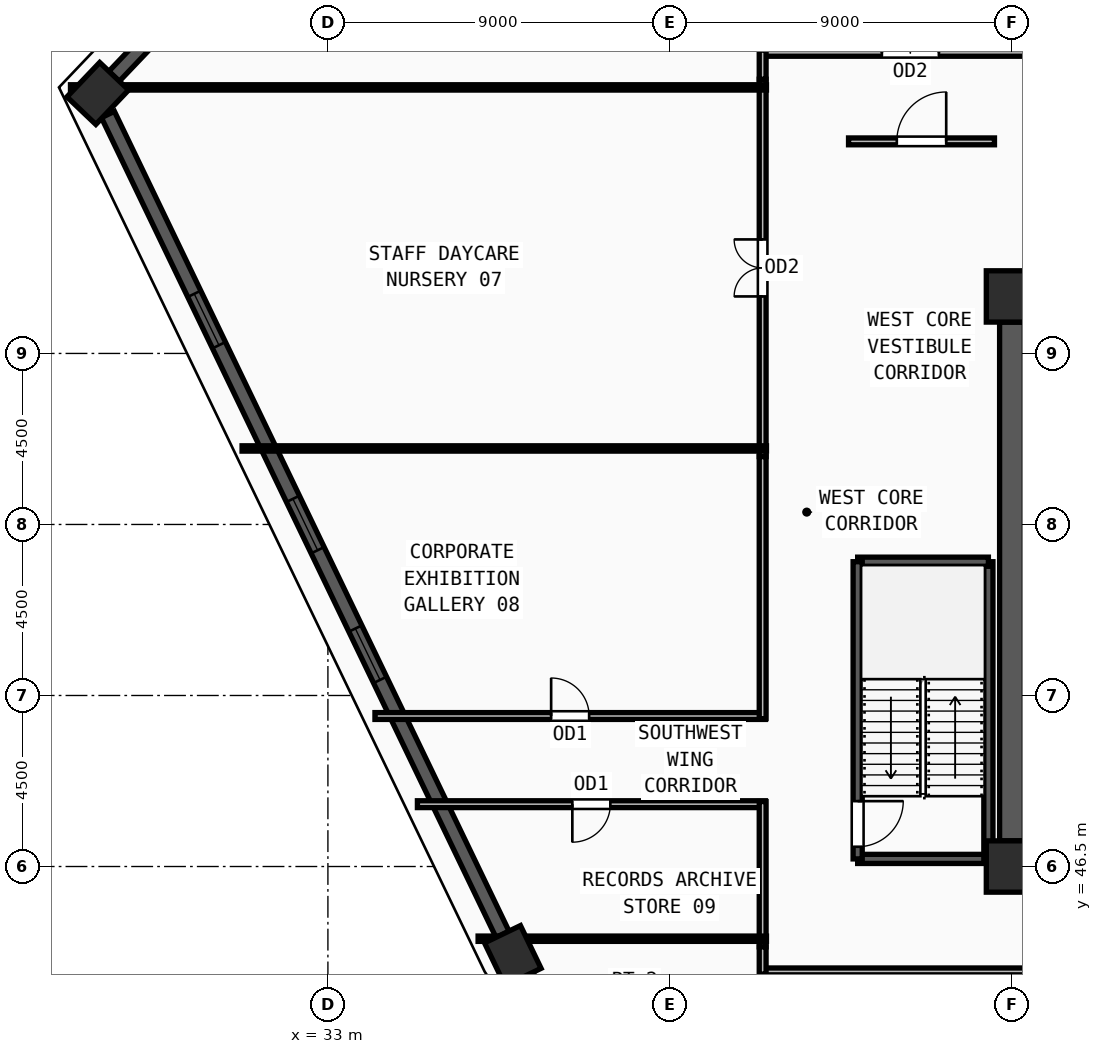
"""IFC4 building model, lengths in metres.
Left out: names, types, materials, properties, quantities, classifications, styles, units other than length and angle.
Written with IfcOpenShell. Run it as: python <this file> out.ifc"""

import sys

from ifc_helpers import new_model, si_unit, direction, frame, frame_2d, origin, origin_2d, place, context, subcontext, project, spatial, rectangle, extrude, source, transform, mapped, element, fill, save


model = new_model("IFC4")
c1 = context("Model", 3, precision=1e-05, world=origin(), true_north=direction((0.0, 1.0)))
c2 = subcontext(c1, "Body", "Model", "MODEL_VIEW")
j1 = project(units=[si_unit("LENGTHUNIT", "METRE"), si_unit("PLANEANGLEUNIT", "RADIAN")], contexts=[c1])
p1 = place(None, origin())
s1 = spatial("IfcSite", under=j1, at=p1, CompositionType="ELEMENT")
p2 = place(p1, origin())
s2 = spatial("IfcBuilding", under=s1, at=p2, CompositionType="ELEMENT")
p3 = place(p2, frame((0.0, 0.0, 224.25)))
s3 = spatial("IfcBuildingStorey", under=s2, at=p3, CompositionType="ELEMENT", Elevation=224.25)
m1 = source(origin(), c2, "Body", "SweptSolid", [
    extrude(rectangle(XDim=1.35, YDim=1.35, at=origin_2d()), origin(), (0.0, 0.0, 1.0), 3.75),
])
for number, where, z_axis, x_axis in (
    (1, (51.0, 46.5, 0.0), (0.0, 0.0, 1.0), (1.0, 0.0, 0.0)),
    (2, (51.0, 61.5, 0.0), (0.0, 0.0, 1.0), (1.0, 0.0, 0.0)),
):
    element("IfcColumn", number, at=place(p3, frame(where, z_axis=z_axis, x_axis=x_axis)), inside=s3, PredefinedType="COLUMN", context=c2, shape_type="MappedRepresentation", body=[
        mapped(m1, transform((0.0, 0.0, 0.0), x_axis=(1.0, 0.0, 0.0), y_axis=(0.0, 1.0, 0.0), z_axis=(0.0, 0.0, 1.0), scale=1.0)),
    ])
m2 = source(origin(), c2, "Body", "SweptSolid", [
    extrude(rectangle(XDim=1.25, YDim=1.05, at=origin_2d()), origin(), (0.0, 0.0, 1.0), 3.75),
])
for number, where, z_axis, x_axis in (
    (3, (37.865, 44.155, 0.0), (0.0, 0.0, 1.0), (-0.434, 0.901, 0.0)),
    (4, (26.944, 66.841, 0.0), (0.0, 0.0, 1.0), (0.689, 0.724, 0.0)),
):
    element("IfcColumn", number, at=place(p3, frame(where, z_axis=z_axis, x_axis=x_axis)), inside=s3, PredefinedType="COLUMN", context=c2, shape_type="MappedRepresentation", body=[
        mapped(m2, transform((0.0, 0.0, 0.0), x_axis=(1.0, 0.0, 0.0), y_axis=(0.0, 1.0, 0.0), z_axis=(0.0, 0.0, 1.0), scale=1.0)),
    ])
p4 = place(p3, frame((30.354, 70.425, 0.0), z_axis=(0.0, 0.0, 1.0), x_axis=(-0.689360975367, -0.724418004774, 0.0)))
e5 = element("IfcWall", 5, at=p4, inside=s3, PredefinedType="SOLIDWALL", context=c2, shape_type="SweptSolid", body=[
    extrude(rectangle(XDim=4.332, YDim=0.38, at=frame_2d((2.166, 0.0))), origin(), (0.0, 0.0, 1.0), 3.57),
])
m3 = source(origin(), c2, "Body", "SweptSolid", [
    extrude(rectangle(XDim=1.2, YDim=1.9, at=frame_2d((0.6, 0.95))), frame((0.0, 0.2, 0.0), z_axis=(0.0, -1.0, 0.0), x_axis=(1.0, 0.0, 0.0)), (0.0, 0.0, 1.0), 0.4),
])
p5 = place(p4, frame((1.566, 0.0, 0.55)))
e6 = element("IfcOpeningElement", 6, at=p5, cuts=e5, PredefinedType="OPENING", context=c2, shape_type="MappedRepresentation", body=[
    mapped(m3, transform((0.0, 0.0, 0.0), x_axis=(1.0, 0.0, 0.0), y_axis=(0.0, 1.0, 0.0), z_axis=(0.0, 0.0, 1.0), scale=1.0)),
])
p6 = place(p3, frame((27.211, 66.287, 0.0), z_axis=(0.0, 0.0, 1.0), x_axis=(0.433730710757, -0.901042546469, 0.0)))
e7 = element("IfcWall", 7, at=p6, inside=s3, PredefinedType="SOLIDWALL", context=c2, shape_type="SweptSolid", body=[
    extrude(rectangle(XDim=23.948, YDim=0.38, at=frame_2d((11.974, 0.0))), origin(), (0.0, 0.0, 1.0), 3.57),
])
m4 = source(origin(), c2, "Body", "SweptSolid", [
    extrude(rectangle(XDim=1.5, YDim=1.9, at=frame_2d((0.75, 0.95))), frame((0.0, 0.2, 0.0), z_axis=(0.0, -1.0, 0.0), x_axis=(1.0, 0.0, 0.0)), (0.0, 0.0, 1.0), 0.4),
])
p7 = place(p6, frame((5.237, 0.0, 0.55)))
e8 = element("IfcOpeningElement", 8, at=p7, cuts=e7, PredefinedType="OPENING", context=c2, shape_type="MappedRepresentation", body=[
    mapped(m4, transform((0.0, 0.0, 0.0), x_axis=(1.0, 0.0, 0.0), y_axis=(0.0, 1.0, 0.0), z_axis=(0.0, 0.0, 1.0), scale=1.0)),
])
p8 = place(p6, frame((11.224, 0.0, 0.55)))
e9 = element("IfcOpeningElement", 9, at=p8, cuts=e7, PredefinedType="OPENING", context=c2, shape_type="MappedRepresentation", body=[
    mapped(m4, transform((0.0, 0.0, 0.0), x_axis=(1.0, 0.0, 0.0), y_axis=(0.0, 1.0, 0.0), z_axis=(0.0, 0.0, 1.0), scale=1.0)),
])
p9 = place(p6, frame((15.011, 0.0, 0.55)))
e10 = element("IfcOpeningElement", 10, at=p9, cuts=e7, PredefinedType="OPENING", context=c2, shape_type="MappedRepresentation", body=[
    mapped(m4, transform((0.0, 0.0, 0.0), x_axis=(1.0, 0.0, 0.0), y_axis=(0.0, 1.0, 0.0), z_axis=(0.0, 0.0, 1.0), scale=1.0)),
])
p10 = place(p3, frame((38.205, 43.643, 0.0), z_axis=(0.0, 0.0, 1.0), x_axis=(0.553179293126, -0.83306222436, 0.0)))
e11 = element("IfcWall", 11, at=p10, inside=s3, PredefinedType="SOLIDWALL", context=c2, shape_type="SweptSolid", body=[
    extrude(rectangle(XDim=29.023, YDim=0.38, at=frame_2d((14.511, 0.0))), origin(), (0.0, 0.0, 1.0), 3.57),
])
p11 = place(p10, frame((6.506, 0.0, 0.55)))
e12 = element("IfcOpeningElement", 12, at=p11, cuts=e11, PredefinedType="OPENING", context=c2, shape_type="MappedRepresentation", body=[
    mapped(m4, transform((0.0, 0.0, 0.0), x_axis=(1.0, 0.0, 0.0), y_axis=(0.0, 1.0, 0.0), z_axis=(0.0, 0.0, 1.0), scale=1.0)),
])
p12 = place(p10, frame((13.762, 0.0, 0.55)))
e13 = element("IfcOpeningElement", 13, at=p12, cuts=e11, PredefinedType="OPENING", context=c2, shape_type="MappedRepresentation", body=[
    mapped(m4, transform((0.0, 0.0, 0.0), x_axis=(1.0, 0.0, 0.0), y_axis=(0.0, 1.0, 0.0), z_axis=(0.0, 0.0, 1.0), scale=1.0)),
])
p13 = place(p10, frame((21.017, 0.0, 0.55)))
e14 = element("IfcOpeningElement", 14, at=p13, cuts=e11, PredefinedType="OPENING", context=c2, shape_type="MappedRepresentation", body=[
    mapped(m4, transform((0.0, 0.0, 0.0), x_axis=(1.0, 0.0, 0.0), y_axis=(0.0, 1.0, 0.0), z_axis=(0.0, 0.0, 1.0), scale=1.0)),
])
p14 = place(p3, frame((51.0, 47.175, 0.0), z_axis=(0.0, 0.0, 1.0), x_axis=(0.0, 1.0, 0.0)))
e15 = element("IfcWall", 15, at=p14, inside=s3, PredefinedType="SHEAR", context=c2, shape_type="SweptSolid", body=[
    extrude(rectangle(XDim=13.65, YDim=0.65, at=frame_2d((6.825, 0.0))), origin(), (0.0, 0.0, 1.0), 3.57),
])
p15 = place(p3, frame((46.94, 46.7, 0.0), z_axis=(0.0, 0.0, 1.0), x_axis=(1.0, 0.0, 0.0)))
e16 = element("IfcWall", 16, at=p15, inside=s3, PredefinedType="SOLIDWALL", context=c2, shape_type="SweptSolid", body=[
    extrude(rectangle(XDim=3.44, YDim=0.24, at=frame_2d((1.72, 0.0))), origin(), (0.0, 0.0, 1.0), 3.57),
])
p16 = place(p3, frame((50.38, 46.7, 0.0), z_axis=(0.0, 0.0, 1.0), x_axis=(0.0, 1.0, 0.0)))
e17 = element("IfcWall", 17, at=p16, inside=s3, PredefinedType="SOLIDWALL", context=c2, shape_type="SweptSolid", body=[
    extrude(rectangle(XDim=7.82, YDim=0.24, at=frame_2d((3.91, 0.0))), origin(), (0.0, 0.0, 1.0), 3.57),
])
p17 = place(p3, frame((50.38, 54.52, 0.0), z_axis=(0.0, 0.0, 1.0), x_axis=(-1.0, 0.0, 0.0)))
e18 = element("IfcWall", 18, at=p17, inside=s3, PredefinedType="SOLIDWALL", context=c2, shape_type="SweptSolid", body=[
    extrude(rectangle(XDim=3.44, YDim=0.24, at=frame_2d((1.72, 0.0))), origin(), (0.0, 0.0, 1.0), 3.57),
])
p18 = place(p3, frame((46.94, 54.52, 0.0), z_axis=(0.0, 0.0, 1.0), x_axis=(0.0, -1.0, 0.0)))
e19 = element("IfcWall", 19, at=p18, inside=s3, PredefinedType="SOLIDWALL", context=c2, shape_type="SweptSolid", body=[
    extrude(rectangle(XDim=7.82, YDim=0.24, at=frame_2d((3.91, 0.0))), origin(), (0.0, 0.0, 1.0), 3.57),
])
m5 = source(origin(), c2, "Body", "SweptSolid", [
    extrude(rectangle(XDim=1.2, YDim=2.2, at=frame_2d((0.6, 1.1))), frame((0.0, 0.13, 0.0), z_axis=(0.0, -1.0, 0.0), x_axis=(1.0, 0.0, 0.0)), (0.0, 0.0, 1.0), 0.26),
])
p19 = place(p18, frame((6.3, 0.0, 0.0)))
e20 = element("IfcOpeningElement", 20, at=p19, cuts=e19, PredefinedType="OPENING", context=c2, shape_type="MappedRepresentation", body=[
    mapped(m5, transform((0.0, 0.0, 0.0), x_axis=(1.0, 0.0, 0.0), y_axis=(0.0, 1.0, 0.0), z_axis=(0.0, 0.0, 1.0), scale=1.0)),
])
p20 = place(p3, frame((46.7, 65.58, 0.0), z_axis=(0.0, 0.0, 1.0), x_axis=(1.0, 0.0, 0.0)))
e21 = element("IfcWall", 21, at=p20, inside=s3, PredefinedType="PARTITIONING", context=c2, shape_type="SweptSolid", body=[
    extrude(rectangle(XDim=3.84, YDim=0.18, at=frame_2d((1.92, 0.0))), origin(), (0.0, 0.0, 1.0), 3.57),
])
m6 = source(origin(), c2, "Body", "SweptSolid", [
    extrude(rectangle(XDim=1.3, YDim=2.2, at=frame_2d((0.65, 1.1))), frame((0.0, 0.1, 0.0), z_axis=(0.0, -1.0, 0.0), x_axis=(1.0, 0.0, 0.0)), (0.0, 0.0, 1.0), 0.2),
])
p21 = place(p20, frame((1.27, 0.0, 0.0)))
e22 = element("IfcOpeningElement", 22, at=p21, cuts=e21, PredefinedType="OPENING", context=c2, shape_type="MappedRepresentation", body=[
    mapped(m6, transform((0.0, 0.0, 0.0), x_axis=(1.0, 0.0, 0.0), y_axis=(0.0, 1.0, 0.0), z_axis=(0.0, 0.0, 1.0), scale=1.0)),
])
p22 = place(p3, frame((44.37, 67.91, 0.0), z_axis=(0.0, 0.0, 1.0), x_axis=(1.0, 0.0, 0.0)))
e23 = element("IfcWall", 23, at=p22, inside=s3, PredefinedType="PARTITIONING", context=c2, shape_type="SweptSolid", body=[
    extrude(rectangle(XDim=7.915, YDim=0.18, at=frame_2d((3.958, 0.0))), origin(), (0.0, 0.0, 1.0), 3.205),
])
m7 = source(origin(), c2, "Body", "SweptSolid", [
    extrude(rectangle(XDim=1.5, YDim=2.2, at=frame_2d((0.75, 1.1))), frame((0.0, 0.1, 0.0), z_axis=(0.0, -1.0, 0.0), x_axis=(1.0, 0.0, 0.0)), (0.0, 0.0, 1.0), 0.2),
])
p23 = place(p22, frame((3.207, 0.0, 0.0)))
e24 = element("IfcOpeningElement", 24, at=p23, cuts=e23, PredefinedType="OPENING", context=c2, shape_type="MappedRepresentation", body=[
    mapped(m7, transform((0.0, 0.0, 0.0), x_axis=(1.0, 0.0, 0.0), y_axis=(0.0, 1.0, 0.0), z_axis=(0.0, 0.0, 1.0), scale=1.0)),
])
p24 = place(p3, frame((44.44, 57.285, 0.0), z_axis=(0.0, 0.0, 1.0), x_axis=(0.0, 1.0, 0.0)))
e25 = element("IfcWall", 25, at=p24, inside=s3, PredefinedType="PARTITIONING", context=c2, shape_type="SweptSolid", body=[
    extrude(rectangle(XDim=9.93, YDim=0.18, at=frame_2d((4.965, 0.0))), origin(), (0.0, 0.0, 1.0), 3.57),
])
p25 = place(p24, frame((4.215, 0.0, 0.0)))
e26 = element("IfcOpeningElement", 26, at=p25, cuts=e25, PredefinedType="OPENING", context=c2, shape_type="MappedRepresentation", body=[
    mapped(m7, transform((0.0, 0.0, 0.0), x_axis=(1.0, 0.0, 0.0), y_axis=(0.0, 1.0, 0.0), z_axis=(0.0, 0.0, 1.0), scale=1.0)),
])
p26 = place(p3, frame((34.238, 50.46, 0.0), z_axis=(0.0, 0.0, 1.0), x_axis=(1.0, 0.0, 0.0)))
e27 = element("IfcWall", 27, at=p26, inside=s3, PredefinedType="PARTITIONING", context=c2, shape_type="SweptSolid", body=[
    extrude(rectangle(XDim=10.272, YDim=0.18, at=frame_2d((5.136, 0.0))), origin(), (0.0, 0.0, 1.0), 3.57),
])
m8 = source(origin(), c2, "Body", "SweptSolid", [
    extrude(rectangle(XDim=1.0, YDim=2.2, at=frame_2d((0.5, 1.1))), frame((0.0, 0.1, 0.0), z_axis=(0.0, -1.0, 0.0), x_axis=(1.0, 0.0, 0.0)), (0.0, 0.0, 1.0), 0.2),
])
p27 = place(p26, frame((4.636, 0.0, 0.0)))
e28 = element("IfcOpeningElement", 28, at=p27, cuts=e27, PredefinedType="OPENING", context=c2, shape_type="MappedRepresentation", body=[
    mapped(m8, transform((0.0, 0.0, 0.0), x_axis=(1.0, 0.0, 0.0), y_axis=(0.0, 1.0, 0.0), z_axis=(0.0, 0.0, 1.0), scale=1.0)),
])
p28 = place(p3, frame((44.51, 48.14, 0.0), z_axis=(0.0, 0.0, 1.0), x_axis=(-1.0, 0.0, 0.0)))
e29 = element("IfcWall", 29, at=p28, inside=s3, PredefinedType="PARTITIONING", context=c2, shape_type="SweptSolid", body=[
    extrude(rectangle(XDim=9.155, YDim=0.18, at=frame_2d((4.578, 0.0))), origin(), (0.0, 0.0, 1.0), 3.57),
])
p29 = place(p28, frame((4.078, 0.0, 0.0)))
e30 = element("IfcOpeningElement", 30, at=p29, cuts=e29, PredefinedType="OPENING", context=c2, shape_type="MappedRepresentation", body=[
    mapped(m8, transform((0.0, 0.0, 0.0), x_axis=(1.0, 0.0, 0.0), y_axis=(0.0, 1.0, 0.0), z_axis=(0.0, 0.0, 1.0), scale=1.0)),
])
p30 = place(p3, frame((65.215, 43.74, 0.0), z_axis=(0.0, 0.0, 1.0), x_axis=(-1.0, 0.0, 0.0)))
e31 = element("IfcWall", 31, at=p30, inside=s3, PredefinedType="PARTITIONING", context=c2, shape_type="SweptSolid", body=[
    extrude(rectangle(XDim=20.845, YDim=0.18, at=frame_2d((10.422, 0.0))), origin(), (0.0, 0.0, 1.0), 3.57),
])
p31 = place(p30, frame((9.673, 0.0, 0.0)))
e32 = element("IfcOpeningElement", 32, at=p31, cuts=e31, PredefinedType="OPENING", context=c2, shape_type="MappedRepresentation", body=[
    mapped(m7, transform((0.0, 0.0, 0.0), x_axis=(1.0, 0.0, 0.0), y_axis=(0.0, 1.0, 0.0), z_axis=(0.0, 0.0, 1.0), scale=1.0)),
])
p32 = place(p3, frame((44.44, 67.215, 0.0), z_axis=(0.0, 0.0, 1.0), x_axis=(0.0, 1.0, 0.0)))
e33 = element("IfcWall", 33, at=p32, inside=s3, PredefinedType="PARTITIONING", context=c2, shape_type="SweptSolid", body=[
    extrude(rectangle(XDim=0.765, YDim=0.18, at=frame_2d((0.382, 0.0))), origin(), (0.0, 0.0, 1.0), 3.57),
])
p33 = place(p3, frame((44.44, 50.39, 0.0), z_axis=(0.0, 0.0, 1.0), x_axis=(0.0, 1.0, 0.0)))
e34 = element("IfcWall", 34, at=p33, inside=s3, PredefinedType="PARTITIONING", context=c2, shape_type="SweptSolid", body=[
    extrude(rectangle(XDim=6.895, YDim=0.18, at=frame_2d((3.448, 0.0))), origin(), (0.0, 0.0, 1.0), 3.57),
])
p34 = place(p3, frame((44.44, 44.385, 0.0), z_axis=(0.0, 0.0, 1.0), x_axis=(0.0, 1.0, 0.0)))
e35 = element("IfcWall", 35, at=p34, inside=s3, PredefinedType="PARTITIONING", context=c2, shape_type="SweptSolid", body=[
    extrude(rectangle(XDim=3.825, YDim=0.18, at=frame_2d((1.913, 0.0))), origin(), (0.0, 0.0, 1.0), 3.57),
])
p35 = place(p3, frame((44.44, 43.67, 0.0), z_axis=(0.0, 0.0, 1.0), x_axis=(0.0, 1.0, 0.0)))
e36 = element("IfcWall", 36, at=p35, inside=s3, PredefinedType="PARTITIONING", context=c2, shape_type="SweptSolid", body=[
    extrude(rectangle(XDim=0.715, YDim=0.18, at=frame_2d((0.357, 0.0))), origin(), (0.0, 0.0, 1.0), 3.57),
])
p36 = place(p3, frame((44.54, 44.6, 0.0), z_axis=(0.0, 0.0, 1.0), x_axis=(-1.0, 0.0, 0.0)))
e37 = element("IfcWall", 37, at=p36, inside=s3, PredefinedType="PARTITIONING", context=c2, shape_type="SweptSolid", body=[
    extrude(rectangle(XDim=7.588, YDim=0.14, at=frame_2d((3.794, 0.0))), origin(), (0.0, 0.0, 1.0), 3.57),
])
p37 = place(p3, frame((44.54, 57.5, 0.0), z_axis=(0.0, 0.0, 1.0), x_axis=(-1.0, 0.0, 0.0)))
e38 = element("IfcWall", 38, at=p37, inside=s3, PredefinedType="PARTITIONING", context=c2, shape_type="SweptSolid", body=[
    extrude(rectangle(XDim=13.799, YDim=0.14, at=frame_2d((6.899, 0.0))), origin(), (0.0, 0.0, 1.0), 3.57),
])
p38 = place(p3, frame((44.54, 67.0, 0.0), z_axis=(0.0, 0.0, 1.0), x_axis=(-1.0, 0.0, 0.0)))
e39 = element("IfcWall", 39, at=p38, inside=s3, PredefinedType="PARTITIONING", context=c2, shape_type="SweptSolid", body=[
    extrude(rectangle(XDim=18.314, YDim=0.14, at=frame_2d((9.157, 0.0))), origin(), (0.0, 0.0, 1.0), 3.57),
])
m9 = source(origin(), c2, "Body", "SweptSolid", [
    extrude(rectangle(XDim=1.5, YDim=1.9, at=frame_2d((0.75, 0.95))), frame((0.0, 0.03, 0.0), z_axis=(0.0, -1.0, 0.0), x_axis=(1.0, 0.0, 0.0)), (0.0, 0.0, 1.0), 0.06),
])
p39 = place(p7, origin())
e40 = element("IfcWindow", 40, at=p39, inside=s3, PartitioningType="DOUBLE_PANEL_VERTICAL", PredefinedType="WINDOW", context=c2, shape_type="MappedRepresentation", body=[
    mapped(m9, transform((0.0, 0.0, 0.0), x_axis=(1.0, 0.0, 0.0), y_axis=(0.0, 1.0, 0.0), z_axis=(0.0, 0.0, 1.0), scale=1.0)),
])
fill(e8, e40)
p40 = place(p8, origin())
e41 = element("IfcWindow", 41, at=p40, inside=s3, PartitioningType="DOUBLE_PANEL_VERTICAL", PredefinedType="WINDOW", context=c2, shape_type="MappedRepresentation", body=[
    mapped(m9, transform((0.0, 0.0, 0.0), x_axis=(1.0, 0.0, 0.0), y_axis=(0.0, 1.0, 0.0), z_axis=(0.0, 0.0, 1.0), scale=1.0)),
])
fill(e9, e41)
p41 = place(p9, origin())
e42 = element("IfcWindow", 42, at=p41, inside=s3, PartitioningType="DOUBLE_PANEL_VERTICAL", PredefinedType="WINDOW", context=c2, shape_type="MappedRepresentation", body=[
    mapped(m9, transform((0.0, 0.0, 0.0), x_axis=(1.0, 0.0, 0.0), y_axis=(0.0, 1.0, 0.0), z_axis=(0.0, 0.0, 1.0), scale=1.0)),
])
fill(e10, e42)
m10 = source(origin(), c2, "Body", "SweptSolid", [
    extrude(rectangle(XDim=1.2, YDim=2.2, at=frame_2d((0.6, 1.1))), frame((0.0, 0.025, 0.0), z_axis=(0.0, -1.0, 0.0), x_axis=(1.0, 0.0, 0.0)), (0.0, 0.0, 1.0), 0.05),
])
p42 = place(p19, origin())
e43 = element("IfcDoor", 43, at=p42, inside=s3, OperationType="SINGLE_SWING_LEFT", PredefinedType="DOOR", context=c2, shape_type="MappedRepresentation", body=[
    mapped(m10, transform((0.0, 0.0, 0.0), x_axis=(1.0, 0.0, 0.0), y_axis=(0.0, 1.0, 0.0), z_axis=(0.0, 0.0, 1.0), scale=1.0)),
])
fill(e20, e43)
m11 = source(origin(), c2, "Body", "SweptSolid", [
    extrude(rectangle(XDim=1.3, YDim=2.2, at=frame_2d((0.65, 1.1))), frame((0.0, 0.025, 0.0), z_axis=(0.0, -1.0, 0.0), x_axis=(1.0, 0.0, 0.0)), (0.0, 0.0, 1.0), 0.05),
])
p43 = place(p21, origin())
e44 = element("IfcDoor", 44, at=p43, inside=s3, OperationType="SINGLE_SWING_RIGHT", PredefinedType="DOOR", context=c2, shape_type="MappedRepresentation", body=[
    mapped(m11, transform((0.0, 0.0, 0.0), x_axis=(1.0, 0.0, 0.0), y_axis=(0.0, 1.0, 0.0), z_axis=(0.0, 0.0, 1.0), scale=1.0)),
])
fill(e22, e44)
m12 = source(origin(), c2, "Body", "SweptSolid", [
    extrude(rectangle(XDim=1.5, YDim=2.2, at=frame_2d((0.75, 1.1))), frame((0.0, 0.025, 0.0), z_axis=(0.0, -1.0, 0.0), x_axis=(1.0, 0.0, 0.0)), (0.0, 0.0, 1.0), 0.05),
])
p44 = place(p23, origin())
e45 = element("IfcDoor", 45, at=p44, inside=s3, OperationType="DOUBLE_DOOR_SINGLE_SWING", PredefinedType="DOOR", context=c2, shape_type="MappedRepresentation", body=[
    mapped(m12, transform((0.0, 0.0, 0.0), x_axis=(1.0, 0.0, 0.0), y_axis=(0.0, 1.0, 0.0), z_axis=(0.0, 0.0, 1.0), scale=1.0)),
])
fill(e24, e45)
p45 = place(p25, origin())
e46 = element("IfcDoor", 46, at=p45, inside=s3, OperationType="DOUBLE_DOOR_SINGLE_SWING", PredefinedType="DOOR", context=c2, shape_type="MappedRepresentation", body=[
    mapped(m12, transform((0.0, 0.0, 0.0), x_axis=(1.0, 0.0, 0.0), y_axis=(0.0, 1.0, 0.0), z_axis=(0.0, 0.0, 1.0), scale=1.0)),
])
fill(e26, e46)
m13 = source(origin(), c2, "Body", "SweptSolid", [
    extrude(rectangle(XDim=1.0, YDim=2.2, at=frame_2d((0.5, 1.1))), frame((0.0, 0.025, 0.0), z_axis=(0.0, -1.0, 0.0), x_axis=(1.0, 0.0, 0.0)), (0.0, 0.0, 1.0), 0.05),
])
p46 = place(p27, origin())
e47 = element("IfcDoor", 47, at=p46, inside=s3, OperationType="SINGLE_SWING_LEFT", PredefinedType="DOOR", context=c2, shape_type="MappedRepresentation", body=[
    mapped(m13, transform((0.0, 0.0, 0.0), x_axis=(1.0, 0.0, 0.0), y_axis=(0.0, 1.0, 0.0), z_axis=(0.0, 0.0, 1.0), scale=1.0)),
])
fill(e28, e47)
p47 = place(p29, origin())
e48 = element("IfcDoor", 48, at=p47, inside=s3, OperationType="SINGLE_SWING_RIGHT", PredefinedType="DOOR", context=c2, shape_type="MappedRepresentation", body=[
    mapped(m13, transform((0.0, 0.0, 0.0), x_axis=(1.0, 0.0, 0.0), y_axis=(0.0, 1.0, 0.0), z_axis=(0.0, 0.0, 1.0), scale=1.0)),
])
fill(e30, e48)
save(model, sys.argv[1])
